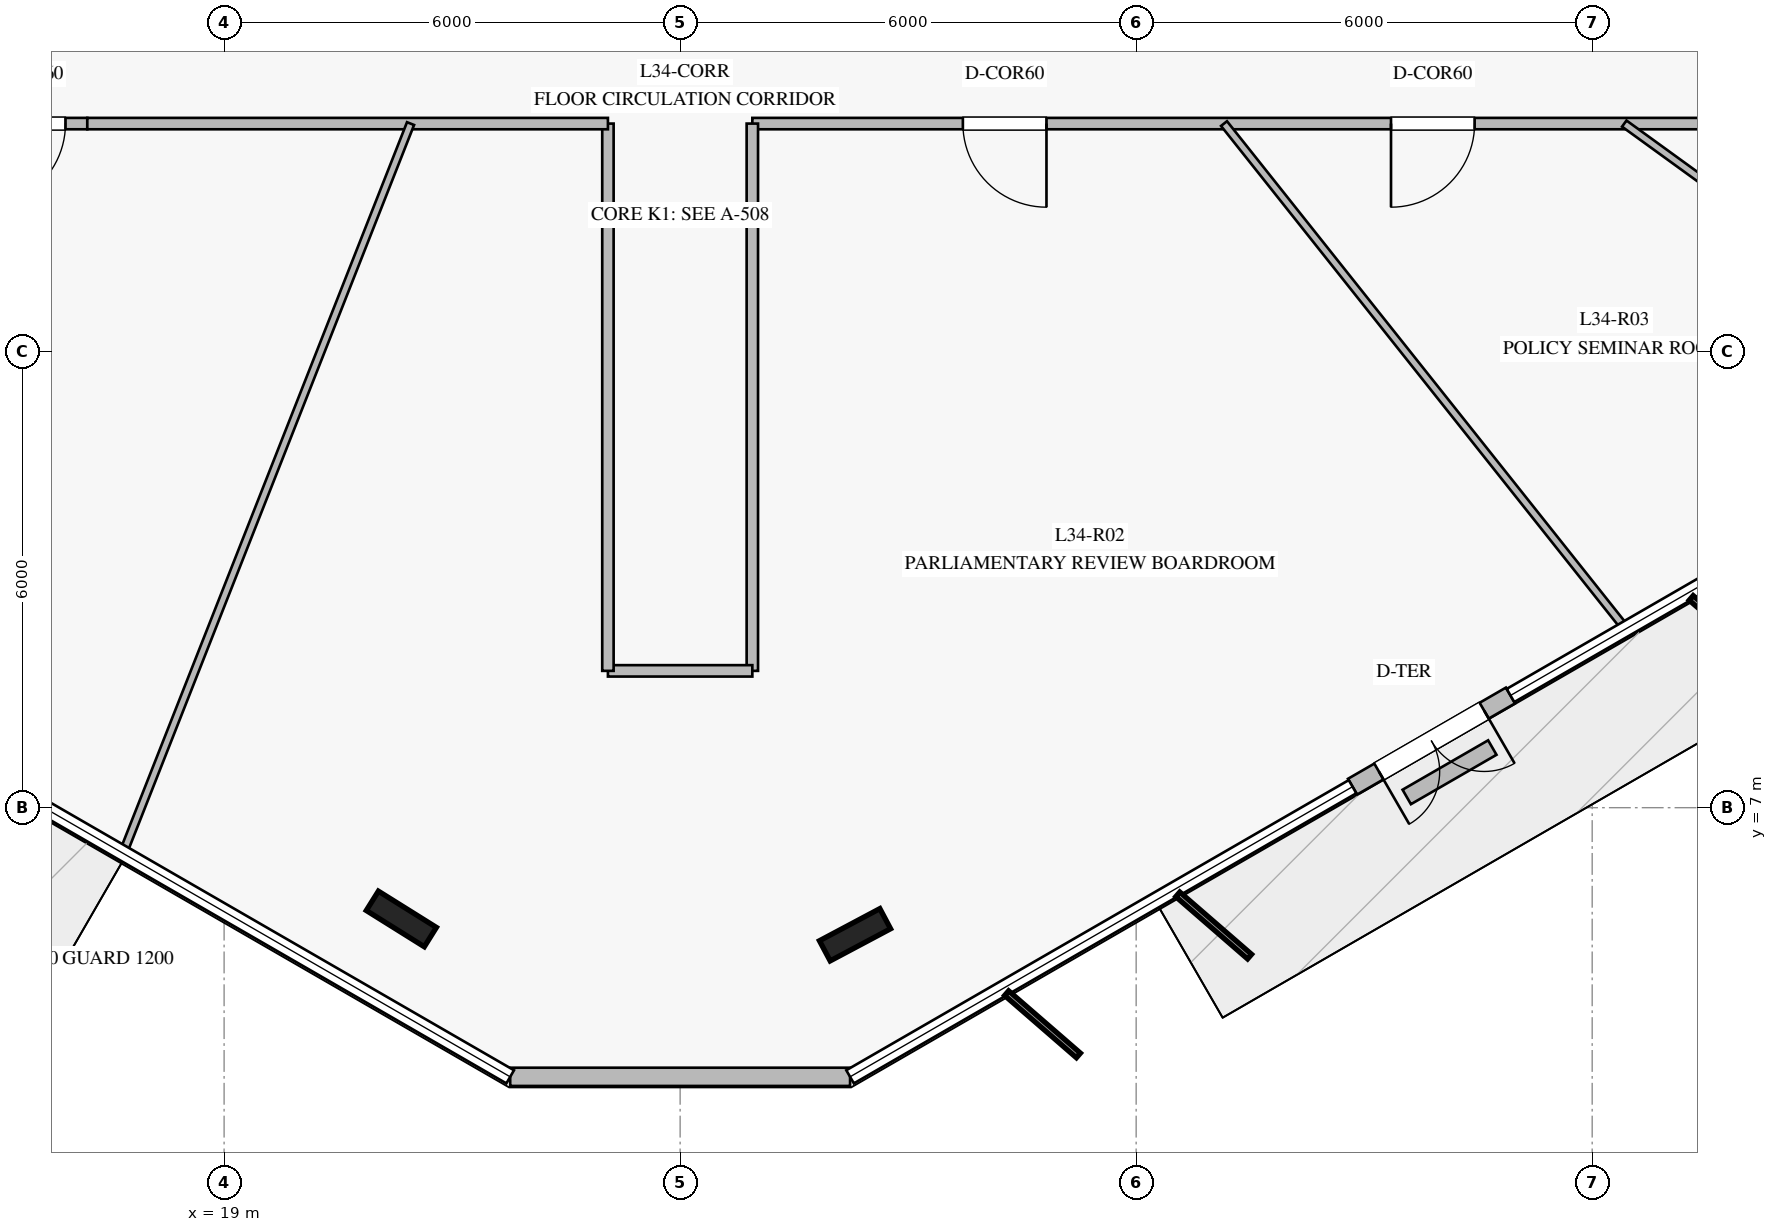
"""IFC4 building model, lengths in metres.
Left out: names, types, materials, properties, quantities, classifications, styles, units other than length and angle.
Written with IfcOpenShell. Run it as: python <this file> out.ifc"""

import sys

from ifc_helpers import new_model, si_unit, direction, frame, frame_2d, origin, origin_2d, place, context, subcontext, project, spatial, rectangle, i_section, extrude, element, fill, save


model = new_model("IFC4")
c1 = context("Model", 3, precision=1e-05, world=origin(), true_north=direction((0.0, 1.0)))
c2 = subcontext(c1, "Body", "Model", "MODEL_VIEW")
j1 = project(units=[si_unit("LENGTHUNIT", "METRE"), si_unit("PLANEANGLEUNIT", "RADIAN")], contexts=[c1])
p1 = place(None, origin())
s1 = spatial("IfcSite", under=j1, at=p1, CompositionType="ELEMENT")
p2 = place(p1, origin())
s2 = spatial("IfcBuilding", under=s1, at=p2, CompositionType="ELEMENT")
p3 = place(p2, frame((0.0, 0.0, 142.4)))
s3 = spatial("IfcBuildingStorey", under=s2, at=p3, CompositionType="ELEMENT", Elevation=142.4)
for number, where, z_axis, x_axis in (
    (1, (21.332, 5.536, 0.0), (0.0, 0.0, 1.0), (-0.848, 0.53, 0.0)),
    (2, (27.301, 5.328, 0.0), (0.0, 0.0, 1.0), (0.883, 0.469, 0.0)),
):
    element("IfcColumn", number, at=place(p3, frame(where, z_axis=z_axis, x_axis=x_axis)), inside=s3, PredefinedType="COLUMN", context=c2, shape_type="SweptSolid", body=[
        extrude(i_section(OverallWidth=0.3, OverallDepth=0.9, WebThickness=0.019, FlangeThickness=0.035, at=origin_2d()), origin(), (0.0, 0.0, 1.0), 4.0),
    ])
p4 = place(p3, frame((22.764, 3.459, 0.0), z_axis=(0.0, 0.0, 1.0), x_axis=(1.0, 0.0, 0.0)))
e3 = element("IfcWall", 3, at=p4, inside=s3, PredefinedType="STANDARD", context=c2, shape_type="SweptSolid", body=[
    extrude(rectangle(XDim=4.472, YDim=0.24, at=frame_2d((2.236, 0.0))), origin(), (0.0, 0.0, 1.0), 3.76),
])
p5 = place(p3, frame((33.847, 7.276, 0.0), z_axis=(0.0, 0.0, 1.0), x_axis=(0.865955154139, 0.50012165622, 0.0)))
e4 = element("IfcWall", 4, at=p5, inside=s3, PredefinedType="STANDARD", context=c2, shape_type="SweptSolid", body=[
    extrude(rectangle(XDim=2.4, YDim=0.24, at=frame_2d((1.2, 0.0))), origin(), (0.0, 0.0, 1.0), 3.76),
])
p6 = place(p5, frame((0.4, 0.0, 0.0)))
e5 = element("IfcOpeningElement", 5, at=p6, cuts=e4, PredefinedType="OPENING", context=c2, shape_type="SweptSolid", body=[
    extrude(rectangle(XDim=1.6, YDim=2.25, at=frame_2d((0.8, 1.125))), frame((0.0, 0.13, 0.0), z_axis=(0.0, -1.0, 0.0), x_axis=(1.0, 0.0, 0.0)), (0.0, 0.0, 1.0), 0.26),
])
p7 = place(p3, frame((34.56, 7.141, 0.0), z_axis=(0.0, 0.0, 1.0), x_axis=(0.866085525409, 0.49989585183, 0.0)))
e6 = element("IfcWall", 6, at=p7, inside=s3, PredefinedType="USERDEFINED", context=c2, shape_type="SweptSolid", body=[
    extrude(rectangle(XDim=1.3, YDim=0.22, at=frame_2d((0.65, 0.0))), origin(), (0.0, 0.0, 1.0), 0.4),
])
p8 = place(p3, frame((17.2, 16.0, 0.0), z_axis=(0.0, 0.0, 1.0), x_axis=(-1.0, 0.0, 0.0)))
e7 = element("IfcWall", 7, at=p8, inside=s3, PredefinedType="PARTITIONING", context=c2, shape_type="SweptSolid", body=[
    extrude(rectangle(XDim=1.8, YDim=0.15, at=frame_2d((0.9, 0.0))), origin(), (0.0, 0.0, 1.0), 3.36),
])
p9 = place(p8, frame((0.287, 0.0, 0.0)))
e8 = element("IfcOpeningElement", 8, at=p9, cuts=e7, PredefinedType="OPENING", context=c2, shape_type="SweptSolid", body=[
    extrude(rectangle(XDim=1.1, YDim=2.2, at=frame_2d((0.55, 1.1))), frame((0.0, 0.085, 0.0), z_axis=(0.0, -1.0, 0.0), x_axis=(1.0, 0.0, 0.0)), (0.0, 0.0, 1.0), 0.17),
])
p10 = place(p3, frame((41.2, 16.0, 0.0), z_axis=(0.0, 0.0, 1.0), x_axis=(-1.0, 0.0, 0.0)))
e9 = element("IfcWall", 9, at=p10, inside=s3, PredefinedType="PARTITIONING", context=c2, shape_type="SweptSolid", body=[
    extrude(rectangle(XDim=15.25, YDim=0.15, at=frame_2d((7.625, 0.0))), origin(), (0.0, 0.0, 1.0), 3.21),
])
p11 = place(p10, frame((11.38, 0.0, 0.0)))
e10 = element("IfcOpeningElement", 10, at=p11, cuts=e9, PredefinedType="OPENING", context=c2, shape_type="SweptSolid", body=[
    extrude(rectangle(XDim=1.1, YDim=2.2, at=frame_2d((0.55, 1.1))), frame((0.0, 0.085, 0.0), z_axis=(0.0, -1.0, 0.0), x_axis=(1.0, 0.0, 0.0)), (0.0, 0.0, 1.0), 0.17),
])
p12 = place(p10, frame((5.747, 0.0, 0.0)))
e11 = element("IfcOpeningElement", 11, at=p12, cuts=e9, PredefinedType="OPENING", context=c2, shape_type="SweptSolid", body=[
    extrude(rectangle(XDim=1.1, YDim=2.2, at=frame_2d((0.55, 1.1))), frame((0.0, 0.085, 0.0), z_axis=(0.0, -1.0, 0.0), x_axis=(1.0, 0.0, 0.0)), (0.0, 0.0, 1.0), 0.17),
])
p13 = place(p3, frame((25.95, 16.0, 0.0), z_axis=(0.0, 0.0, 1.0), x_axis=(0.0, -1.0, 0.0)))
e12 = element("IfcWall", 12, at=p13, inside=s3, PredefinedType="PARTITIONING", context=c2, shape_type="SweptSolid", body=[
    extrude(rectangle(XDim=7.2, YDim=0.15, at=frame_2d((3.6, 0.0))), origin(), (0.0, 0.0, 1.0), 3.36),
])
p14 = place(p3, frame((25.95, 8.8, 0.0), z_axis=(0.0, 0.0, 1.0), x_axis=(-1.0, 0.0, 0.0)))
e13 = element("IfcWall", 13, at=p14, inside=s3, PredefinedType="PARTITIONING", context=c2, shape_type="SweptSolid", body=[
    extrude(rectangle(XDim=1.9, YDim=0.15, at=frame_2d((0.95, 0.0))), origin(), (0.0, 0.0, 1.0), 3.76),
])
p15 = place(p3, frame((24.05, 8.8, 0.0), z_axis=(0.0, 0.0, 1.0), x_axis=(0.0, 1.0, 0.0)))
e14 = element("IfcWall", 14, at=p15, inside=s3, PredefinedType="PARTITIONING", context=c2, shape_type="SweptSolid", body=[
    extrude(rectangle(XDim=7.2, YDim=0.15, at=frame_2d((3.6, 0.0))), origin(), (0.0, 0.0, 1.0), 3.36),
])
p16 = place(p3, frame((24.05, 16.0, 0.0), z_axis=(0.0, 0.0, 1.0), x_axis=(-1.0, 0.0, 0.0)))
e15 = element("IfcWall", 15, at=p16, inside=s3, PredefinedType="PARTITIONING", context=c2, shape_type="SweptSolid", body=[
    extrude(rectangle(XDim=6.85, YDim=0.15, at=frame_2d((3.425, 0.0))), origin(), (0.0, 0.0, 1.0), 3.21),
])
p17 = place(p3, frame((21.453, 16.0, 0.0), z_axis=(0.0, 0.0, 1.0), x_axis=(-0.366670004264, -0.930351067056, 0.0)))
e16 = element("IfcWall", 16, at=p17, inside=s3, PredefinedType="MOVABLE", context=c2, shape_type="SweptSolid", body=[
    extrude(rectangle(XDim=10.301, YDim=0.1, at=frame_2d((5.15, 0.0))), origin(), (0.0, 0.0, 1.0), 3.16),
])
p18 = place(p3, frame((32.156, 16.0, 0.0), z_axis=(0.0, 0.0, 1.0), x_axis=(0.622366778273, -0.782725745905, 0.0)))
e17 = element("IfcWall", 17, at=p18, inside=s3, PredefinedType="MOVABLE", context=c2, shape_type="SweptSolid", body=[
    extrude(rectangle(XDim=8.476, YDim=0.1, at=frame_2d((4.238, 0.0))), origin(), (0.0, 0.0, 1.0), 3.05),
])
p19 = place(p3, frame((37.422, 16.0, 0.0), z_axis=(0.0, 0.0, 1.0), x_axis=(0.809732488646, -0.586799196345, 0.0)))
e18 = element("IfcWall", 18, at=p19, inside=s3, PredefinedType="MOVABLE", context=c2, shape_type="SweptSolid", body=[
    extrude(rectangle(XDim=6.297, YDim=0.1, at=frame_2d((3.148, 0.0))), origin(), (0.0, 0.0, 1.0), 3.16),
])
p20 = place(p6, frame((1.6, 0.0, 0.0), z_axis=(0.0, 0.0, 1.0), x_axis=(-1.0, 0.0, 0.0)))
e19 = element("IfcDoor", 19, at=p20, inside=s3, OperationType="DOUBLE_DOOR_SINGLE_SWING", PredefinedType="DOOR", context=c2, shape_type="SweptSolid", body=[
    extrude(rectangle(XDim=1.6, YDim=2.25, at=frame_2d((0.8, 1.125))), frame((0.0, 0.025, 0.0), z_axis=(0.0, -1.0, 0.0), x_axis=(1.0, 0.0, 0.0)), (0.0, 0.0, 1.0), 0.05),
])
fill(e5, e19)
p21 = place(p9, origin())
e20 = element("IfcDoor", 20, at=p21, inside=s3, OperationType="SINGLE_SWING_RIGHT", PredefinedType="DOOR", context=c2, shape_type="SweptSolid", body=[
    extrude(rectangle(XDim=1.1, YDim=2.2, at=frame_2d((0.55, 1.1))), frame((0.0, 0.025, 0.0), z_axis=(0.0, -1.0, 0.0), x_axis=(1.0, 0.0, 0.0)), (0.0, 0.0, 1.0), 0.05),
])
fill(e8, e20)
p22 = place(p11, origin())
e21 = element("IfcDoor", 21, at=p22, inside=s3, OperationType="SINGLE_SWING_LEFT", PredefinedType="DOOR", context=c2, shape_type="SweptSolid", body=[
    extrude(rectangle(XDim=1.1, YDim=2.2, at=frame_2d((0.55, 1.1))), frame((0.0, 0.025, 0.0), z_axis=(0.0, -1.0, 0.0), x_axis=(1.0, 0.0, 0.0)), (0.0, 0.0, 1.0), 0.05),
])
fill(e10, e21)
p23 = place(p12, origin())
e22 = element("IfcDoor", 22, at=p23, inside=s3, OperationType="SINGLE_SWING_RIGHT", PredefinedType="DOOR", context=c2, shape_type="SweptSolid", body=[
    extrude(rectangle(XDim=1.1, YDim=2.2, at=frame_2d((0.55, 1.1))), frame((0.0, 0.025, 0.0), z_axis=(0.0, -1.0, 0.0), x_axis=(1.0, 0.0, 0.0)), (0.0, 0.0, 1.0), 0.05),
])
fill(e11, e22)
save(model, sys.argv[1])
